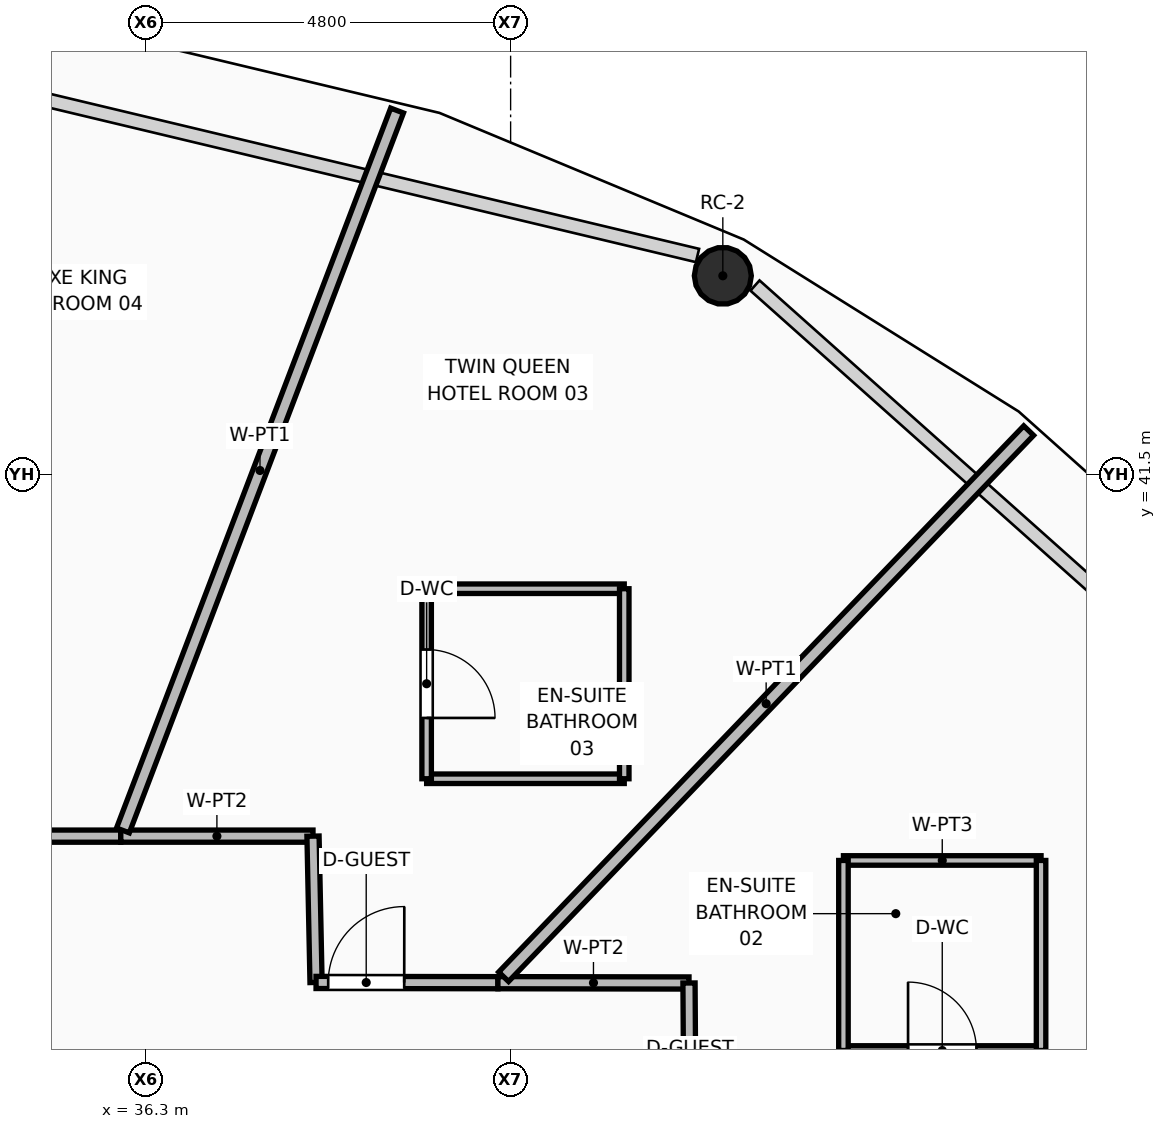
"""IFC4 building model, lengths in metres.
Left out: names, types, materials, properties, quantities, classifications, styles, units other than length and angle.
Written with IfcOpenShell. Run it as: python <this file> out.ifc"""

import sys

from ifc_helpers import new_model, si_unit, direction, frame, frame_2d, origin, origin_2d, place, context, subcontext, project, spatial, rectangle, hollow_circle, extrude, element, fill, save


model = new_model("IFC4")
c1 = context("Model", 3, precision=1e-05, world=origin(), true_north=direction((0.0, 1.0)))
c2 = subcontext(c1, "Body", "Model", "MODEL_VIEW")
j1 = project(units=[si_unit("LENGTHUNIT", "METRE"), si_unit("PLANEANGLEUNIT", "RADIAN")], contexts=[c1])
p1 = place(None, origin())
s1 = spatial("IfcSite", under=j1, at=p1, CompositionType="ELEMENT")
p2 = place(p1, origin())
s2 = spatial("IfcBuilding", under=s1, at=p2, CompositionType="ELEMENT")
p3 = place(p2, frame((0.0, 0.0, 153.45)))
s3 = spatial("IfcBuildingStorey", under=s2, at=p3, CompositionType="ELEMENT", Elevation=153.45)
p4 = place(p3, frame((43.892, 44.112, 0.0), z_axis=(0.0, 0.0, 1.0), x_axis=(1.0, 0.0, 0.0)))
e1 = element("IfcColumn", 1, at=p4, inside=s3, PredefinedType="COLUMN", context=c2, shape_type="SweptSolid", body=[
    extrude(hollow_circle(Radius=0.375, WallThickness=0.035, at=origin_2d()), origin(), (0.0, 0.0, 1.0), 3.57),
])
p5 = place(p3, frame((30.592, 36.74, 0.0), z_axis=(0.0, 0.0, 1.0), x_axis=(1.0, 0.0, 0.0)))
e2 = element("IfcWall", 2, at=p5, inside=s3, PredefinedType="PARTITIONING", context=c2, shape_type="SweptSolid", body=[
    extrude(rectangle(XDim=5.379, YDim=0.16, at=frame_2d((2.689, 0.0))), origin(), (0.0, 0.0, 1.0), 3.006),
])
p6 = place(p5, frame((2.189, 0.0, 0.0)))
e3 = element("IfcOpeningElement", 3, at=p6, cuts=e2, PredefinedType="OPENING", context=c2, shape_type="SweptSolid", body=[
    extrude(rectangle(XDim=1.0, YDim=2.1, at=frame_2d((0.5, 1.05))), frame((0.0, 0.09, 0.0), z_axis=(0.0, -1.0, 0.0), x_axis=(1.0, 0.0, 0.0)), (0.0, 0.0, 1.0), 0.18),
])
p7 = place(p3, frame((35.971, 36.74, 0.0), z_axis=(0.0, 0.0, 1.0), x_axis=(1.0, 0.0, 0.0)))
e4 = element("IfcWall", 4, at=p7, inside=s3, PredefinedType="PARTITIONING", context=c2, shape_type="SweptSolid", body=[
    extrude(rectangle(XDim=2.529, YDim=0.16, at=frame_2d((1.265, 0.0))), origin(), (0.0, 0.0, 1.0), 3.55),
])
p8 = place(p3, frame((38.5, 36.74, 0.0), z_axis=(0.0, 0.0, 1.0), x_axis=(0.020794488077, -0.999783771255, 0.0)))
e5 = element("IfcWall", 5, at=p8, inside=s3, PredefinedType="PARTITIONING", context=c2, shape_type="SweptSolid", body=[
    extrude(rectangle(XDim=1.926, YDim=0.16, at=frame_2d((0.963, 0.0))), origin(), (0.0, 0.0, 1.0), 3.55),
])
p9 = place(p3, frame((38.54, 34.815, 0.0), z_axis=(0.0, 0.0, 1.0), x_axis=(0.999999250619, -0.001224239034, 0.0)))
e6 = element("IfcWall", 6, at=p9, inside=s3, PredefinedType="PARTITIONING", context=c2, shape_type="SweptSolid", body=[
    extrude(rectangle(XDim=2.393, YDim=0.16, at=frame_2d((1.197, 0.0))), origin(), (0.0, 0.0, 1.0), 3.55),
])
p10 = place(p9, frame((0.16, 0.0, 0.0)))
e7 = element("IfcOpeningElement", 7, at=p10, cuts=e6, PredefinedType="OPENING", context=c2, shape_type="SweptSolid", body=[
    extrude(rectangle(XDim=1.0, YDim=2.1, at=frame_2d((0.5, 1.05))), frame((0.0, 0.09, 0.0), z_axis=(0.0, -1.0, 0.0), x_axis=(1.0, 0.0, 0.0)), (0.0, 0.0, 1.0), 0.18),
])
p11 = place(p3, frame((40.933, 34.812, 0.0), z_axis=(0.0, 0.0, 1.0), x_axis=(0.999998792776, -0.00155384876, 0.0)))
e8 = element("IfcWall", 8, at=p11, inside=s3, PredefinedType="PARTITIONING", context=c2, shape_type="SweptSolid", body=[
    extrude(rectangle(XDim=2.514, YDim=0.16, at=frame_2d((1.257, 0.0))), origin(), (0.0, 0.0, 1.0), 3.006),
])
p12 = place(p3, frame((43.447, 34.808, 0.0), z_axis=(0.0, 0.0, 1.0), x_axis=(0.006526585281, -0.999978701615, 0.0)))
e9 = element("IfcWall", 9, at=p12, inside=s3, PredefinedType="PARTITIONING", context=c2, shape_type="SweptSolid", body=[
    extrude(rectangle(XDim=2.768, YDim=0.16, at=frame_2d((1.384, 0.0))), origin(), (0.0, 0.0, 1.0), 3.006),
])
p13 = place(p12, frame((1.608, 0.0, 0.0)))
e10 = element("IfcOpeningElement", 10, at=p13, cuts=e9, PredefinedType="OPENING", context=c2, shape_type="SweptSolid", body=[
    extrude(rectangle(XDim=1.0, YDim=2.1, at=frame_2d((0.5, 1.05))), frame((0.0, 0.09, 0.0), z_axis=(0.0, -1.0, 0.0), x_axis=(1.0, 0.0, 0.0)), (0.0, 0.0, 1.0), 0.18),
])
p14 = place(p3, frame((45.97, 31.382, 0.0), z_axis=(0.0, 0.0, 1.0), x_axis=(0.914998050902, 0.403458259112, 0.0)))
e11 = element("IfcWall", 11, at=p14, inside=s3, PredefinedType="PARTITIONING", context=c2, shape_type="SweptSolid", body=[
    extrude(rectangle(XDim=8.821, YDim=0.18, at=frame_2d((4.41, 0.0))), origin(), (0.0, 0.0, 1.0), 2.852),
])
p15 = place(p3, frame((41.008, 34.89, 0.0), z_axis=(0.0, 0.0, 1.0), x_axis=(0.693069554284, 0.720870718593, 0.0)))
e12 = element("IfcWall", 12, at=p15, inside=s3, PredefinedType="PARTITIONING", context=c2, shape_type="SweptSolid", body=[
    extrude(rectangle(XDim=9.967, YDim=0.18, at=frame_2d((4.984, 0.0))), origin(), (0.0, 0.0, 1.0), 2.852),
])
p16 = place(p3, frame((35.999, 36.815, 0.0), z_axis=(0.0, 0.0, 1.0), x_axis=(0.355905167446, 0.934522076671, 0.0)))
e13 = element("IfcWall", 13, at=p16, inside=s3, PredefinedType="PARTITIONING", context=c2, shape_type="SweptSolid", body=[
    extrude(rectangle(XDim=10.135, YDim=0.18, at=frame_2d((5.067, 0.0))), origin(), (0.0, 0.0, 1.0), 2.852),
])
p17 = place(p3, frame((45.479, 33.92, 0.0), z_axis=(0.0, 0.0, 1.0), x_axis=(1.0, 0.0, 0.0)))
e14 = element("IfcWall", 14, at=p17, inside=s3, PredefinedType="PARTITIONING", context=c2, shape_type="SweptSolid", body=[
    extrude(rectangle(XDim=2.6, YDim=0.125, at=frame_2d((1.3, 0.0))), origin(), (0.0, 0.0, 1.0), 3.006),
])
p18 = place(p17, frame((0.85, 0.0, 0.0)))
e15 = element("IfcOpeningElement", 15, at=p18, cuts=e14, PredefinedType="OPENING", context=c2, shape_type="SweptSolid", body=[
    extrude(rectangle(XDim=0.9, YDim=2.1, at=frame_2d((0.45, 1.05))), frame((0.0, 0.073, 0.0), z_axis=(0.0, -1.0, 0.0), x_axis=(1.0, 0.0, 0.0)), (0.0, 0.0, 1.0), 0.145),
])
p19 = place(p3, frame((45.479, 36.42, 0.0), z_axis=(0.0, 0.0, 1.0), x_axis=(1.0, 0.0, 0.0)))
e16 = element("IfcWall", 16, at=p19, inside=s3, PredefinedType="PARTITIONING", context=c2, shape_type="SweptSolid", body=[
    extrude(rectangle(XDim=2.6, YDim=0.125, at=frame_2d((1.3, 0.0))), origin(), (0.0, 0.0, 1.0), 3.55),
])
for number, where, z_axis, x_axis in (
    (17, (45.479, 33.92, 0.0), (0.0, 0.0, 1.0), (0.0, 1.0, 0.0)),
    (18, (48.079, 33.92, 0.0), (0.0, 0.0, 1.0), (0.0, 1.0, 0.0)),
):
    element("IfcWall", number, at=place(p3, frame(where, z_axis=z_axis, x_axis=x_axis)), inside=s3, PredefinedType="PARTITIONING", context=c2, shape_type="SweptSolid", body=[
        extrude(rectangle(XDim=2.5, YDim=0.125, at=frame_2d((1.25, 0.0))), origin(), (0.0, 0.0, 1.0), 3.006),
    ])
p20 = place(p3, frame((39.995, 37.495, 0.0), z_axis=(0.0, 0.0, 1.0), x_axis=(1.0, 0.0, 0.0)))
e19 = element("IfcWall", 19, at=p20, inside=s3, PredefinedType="PARTITIONING", context=c2, shape_type="SweptSolid", body=[
    extrude(rectangle(XDim=2.6, YDim=0.125, at=frame_2d((1.3, 0.0))), origin(), (0.0, 0.0, 1.0), 3.006),
])
p21 = place(p3, frame((39.995, 39.995, 0.0), z_axis=(0.0, 0.0, 1.0), x_axis=(1.0, 0.0, 0.0)))
e20 = element("IfcWall", 20, at=p21, inside=s3, PredefinedType="PARTITIONING", context=c2, shape_type="SweptSolid", body=[
    extrude(rectangle(XDim=2.6, YDim=0.125, at=frame_2d((1.3, 0.0))), origin(), (0.0, 0.0, 1.0), 3.55),
])
p22 = place(p3, frame((39.995, 37.495, 0.0), z_axis=(0.0, 0.0, 1.0), x_axis=(0.0, 1.0, 0.0)))
e21 = element("IfcWall", 21, at=p22, inside=s3, PredefinedType="PARTITIONING", context=c2, shape_type="SweptSolid", body=[
    extrude(rectangle(XDim=2.5, YDim=0.125, at=frame_2d((1.25, 0.0))), origin(), (0.0, 0.0, 1.0), 3.55),
])
p23 = place(p22, frame((0.8, 0.0, 0.0)))
e22 = element("IfcOpeningElement", 22, at=p23, cuts=e21, PredefinedType="OPENING", context=c2, shape_type="SweptSolid", body=[
    extrude(rectangle(XDim=0.9, YDim=2.1, at=frame_2d((0.45, 1.05))), frame((0.0, 0.073, 0.0), z_axis=(0.0, -1.0, 0.0), x_axis=(1.0, 0.0, 0.0)), (0.0, 0.0, 1.0), 0.145),
])
p24 = place(p3, frame((42.595, 37.495, 0.0), z_axis=(0.0, 0.0, 1.0), x_axis=(0.0, 1.0, 0.0)))
e23 = element("IfcWall", 23, at=p24, inside=s3, PredefinedType="PARTITIONING", context=c2, shape_type="SweptSolid", body=[
    extrude(rectangle(XDim=2.5, YDim=0.125, at=frame_2d((1.25, 0.0))), origin(), (0.0, 0.0, 1.0), 3.006),
])
p25 = place(p18, origin())
e24 = element("IfcDoor", 24, at=p25, inside=s3, OperationType="SINGLE_SWING_LEFT", PredefinedType="DOOR", context=c2, shape_type="SweptSolid", body=[
    extrude(rectangle(XDim=0.9, YDim=2.1, at=frame_2d((0.45, 1.05))), frame((0.0, 0.025, 0.0), z_axis=(0.0, -1.0, 0.0), x_axis=(1.0, 0.0, 0.0)), (0.0, 0.0, 1.0), 0.05),
])
fill(e15, e24)
p26 = place(p23, frame((0.9, 0.0, 0.0), z_axis=(0.0, 0.0, 1.0), x_axis=(-1.0, 0.0, 0.0)))
e25 = element("IfcDoor", 25, at=p26, inside=s3, OperationType="SINGLE_SWING_RIGHT", PredefinedType="DOOR", context=c2, shape_type="SweptSolid", body=[
    extrude(rectangle(XDim=0.9, YDim=2.1, at=frame_2d((0.45, 1.05))), frame((0.0, 0.025, 0.0), z_axis=(0.0, -1.0, 0.0), x_axis=(1.0, 0.0, 0.0)), (0.0, 0.0, 1.0), 0.05),
])
fill(e22, e25)
p27 = place(p10, origin())
e26 = element("IfcDoor", 26, at=p27, inside=s3, OperationType="SINGLE_SWING_RIGHT", PredefinedType="DOOR", context=c2, shape_type="SweptSolid", body=[
    extrude(rectangle(XDim=1.0, YDim=2.1, at=frame_2d((0.5, 1.05))), frame((0.0, 0.025, 0.0), z_axis=(0.0, -1.0, 0.0), x_axis=(1.0, 0.0, 0.0)), (0.0, 0.0, 1.0), 0.05),
])
fill(e7, e26)
save(model, sys.argv[1])
